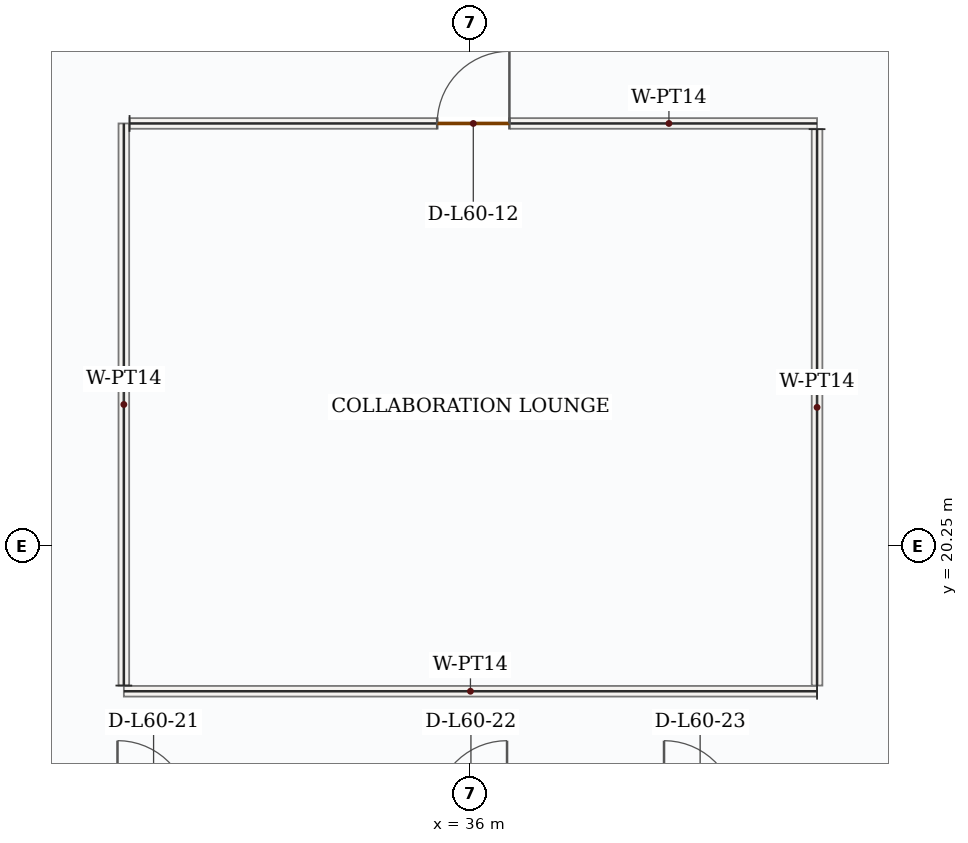
"""IFC4 building model, lengths in metres.
Left out: names, types, materials, properties, quantities, classifications, styles, units other than length and angle.
Written with IfcOpenShell. Run it as: python <this file> out.ifc"""

import sys

from ifc_helpers import new_model, si_unit, direction, frame, frame_2d, origin, place, context, subcontext, project, spatial, rectangle, extrude, source, transform, mapped, element, fill, save


model = new_model("IFC4")
c1 = context("Model", 3, precision=1e-05, world=origin(), true_north=direction((0.0, 1.0)))
c2 = subcontext(c1, "Body", "Model", "MODEL_VIEW")
j1 = project(units=[si_unit("LENGTHUNIT", "METRE"), si_unit("PLANEANGLEUNIT", "RADIAN")], contexts=[c1])
p1 = place(None, origin())
s1 = spatial("IfcSite", under=j1, at=p1, CompositionType="ELEMENT")
p2 = place(p1, origin())
s2 = spatial("IfcBuilding", under=s1, at=p2, CompositionType="ELEMENT")
p3 = place(p2, frame((0.0, 0.0, 254.1)))
s3 = spatial("IfcBuildingStorey", under=s2, at=p3, CompositionType="ELEMENT", Elevation=254.1)
m1 = source(origin(), c2, "Body", "SweptSolid", [
    extrude(rectangle(XDim=9.12, YDim=0.14, at=frame_2d((4.56, 0.0))), origin(), (0.0, 0.0, 1.0), 3.5),
])
p4 = place(p3, frame((40.56, 18.34, 0.0), z_axis=(0.0, 0.0, 1.0), x_axis=(-1.0, 0.0, 0.0)))
e1 = element("IfcWall", 1, at=p4, inside=s3, PredefinedType="PARTITIONING", context=c2, shape_type="MappedRepresentation", body=[
    mapped(m1, transform((0.0, 0.0, 0.0), x_axis=(1.0, 0.0, 0.0), y_axis=(0.0, 1.0, 0.0), z_axis=(0.0, 0.0, 1.0), scale=1.0)),
])
m2 = source(origin(), c2, "Body", "SweptSolid", [
    extrude(rectangle(XDim=7.395, YDim=0.14, at=frame_2d((3.698, 0.0))), origin(), (0.0, 0.0, 1.0), 3.5),
])
p5 = place(p3, frame((31.44, 18.415, 0.0), z_axis=(0.0, 0.0, 1.0), x_axis=(0.0, 1.0, 0.0)))
e2 = element("IfcWall", 2, at=p5, inside=s3, PredefinedType="PARTITIONING", context=c2, shape_type="MappedRepresentation", body=[
    mapped(m2, transform((0.0, 0.0, 0.0), x_axis=(1.0, 0.0, 0.0), y_axis=(0.0, 1.0, 0.0), z_axis=(0.0, 0.0, 1.0), scale=1.0)),
])
p6 = place(p3, frame((31.515, 25.81, 0.0), z_axis=(0.0, 0.0, 1.0), x_axis=(1.0, 0.0, 0.0)))
e3 = element("IfcWall", 3, at=p6, inside=s3, PredefinedType="PARTITIONING", context=c2, shape_type="SweptSolid", body=[
    extrude(rectangle(XDim=9.045, YDim=0.14, at=frame_2d((4.522, 0.0))), origin(), (0.0, 0.0, 1.0), 3.5),
])
p7 = place(p6, frame((4.048, 0.0, 0.0)))
e4 = element("IfcOpeningElement", 4, at=p7, cuts=e3, PredefinedType="OPENING", context=c2, shape_type="SweptSolid", body=[
    extrude(rectangle(XDim=0.95, YDim=2.15, at=frame_2d((0.475, 1.075))), frame((0.0, 0.08, 0.0), z_axis=(0.0, -1.0, 0.0), x_axis=(1.0, 0.0, 0.0)), (0.0, 0.0, 1.0), 0.16),
])
m3 = source(origin(), c2, "Body", "SweptSolid", [
    extrude(rectangle(XDim=7.32, YDim=0.14, at=frame_2d((3.66, 0.0))), origin(), (0.0, 0.0, 1.0), 3.5),
])
p8 = place(p3, frame((40.56, 25.735, 0.0), z_axis=(0.0, 0.0, 1.0), x_axis=(0.0, -1.0, 0.0)))
e5 = element("IfcWall", 5, at=p8, inside=s3, PredefinedType="PARTITIONING", context=c2, shape_type="MappedRepresentation", body=[
    mapped(m3, transform((0.0, 0.0, 0.0), x_axis=(1.0, 0.0, 0.0), y_axis=(0.0, 1.0, 0.0), z_axis=(0.0, 0.0, 1.0), scale=1.0)),
])
m4 = source(origin(), c2, "Body", "SweptSolid", [
    extrude(rectangle(XDim=0.95, YDim=2.15, at=frame_2d((0.475, 1.075))), frame((0.0, 0.025, 0.0), z_axis=(0.0, -1.0, 0.0), x_axis=(1.0, 0.0, 0.0)), (0.0, 0.0, 1.0), 0.05),
])
p9 = place(p7, origin())
e6 = element("IfcDoor", 6, at=p9, inside=s3, OperationType="SINGLE_SWING_RIGHT", PredefinedType="DOOR", context=c2, shape_type="MappedRepresentation", body=[
    mapped(m4, transform((0.0, 0.0, 0.0), x_axis=(1.0, 0.0, 0.0), y_axis=(0.0, 1.0, 0.0), z_axis=(0.0, 0.0, 1.0), scale=1.0)),
])
fill(e4, e6)
save(model, sys.argv[1])
